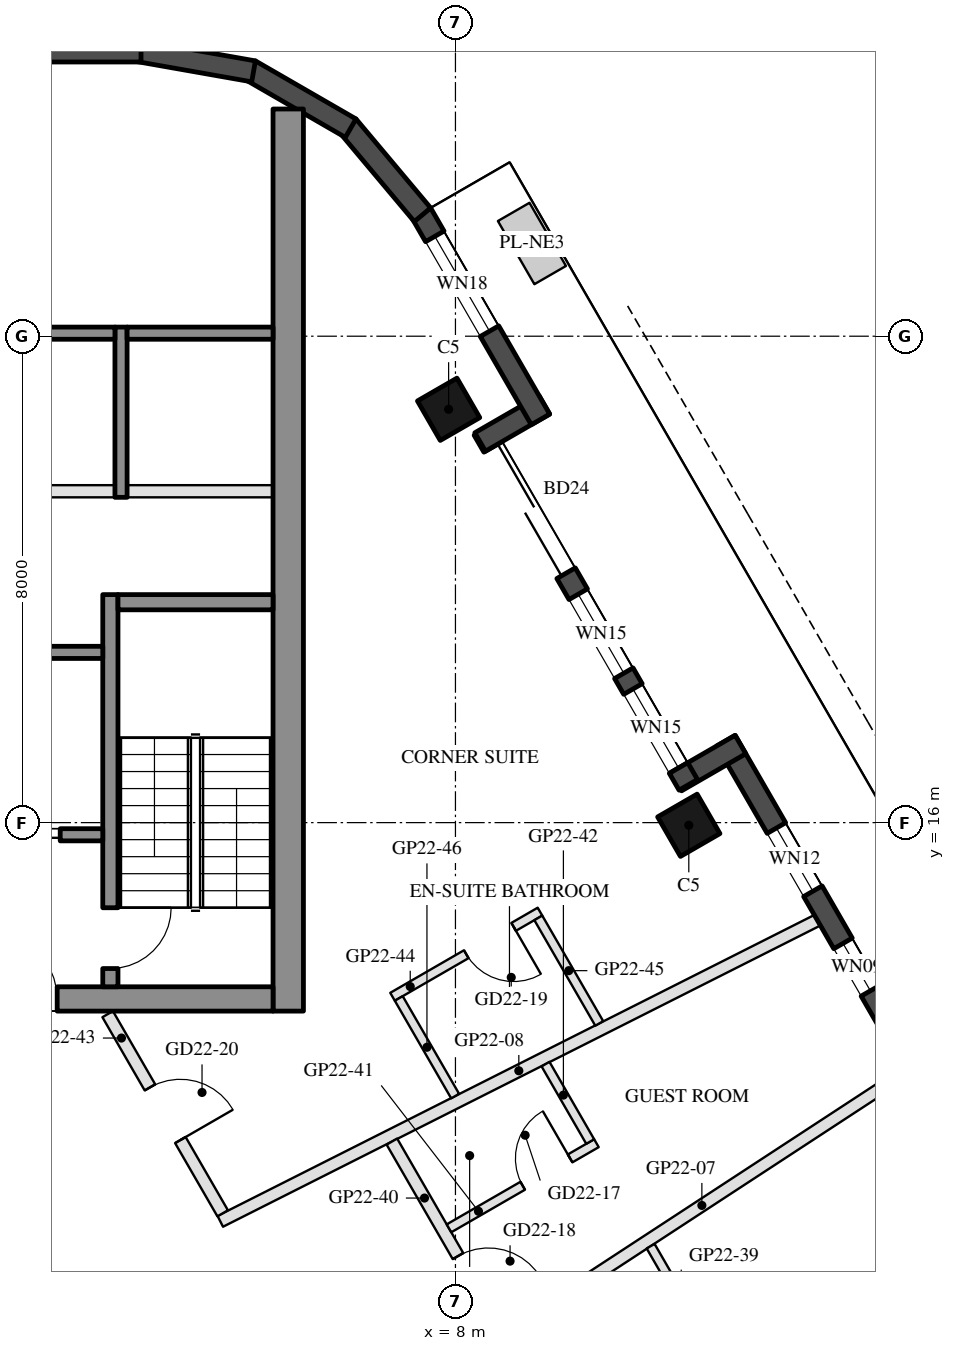
"""IFC4 building model, lengths in metres.
Left out: names, types, materials, properties, quantities, classifications, styles, units other than length and angle.
Written with IfcOpenShell. Run it as: python <this file> out.ifc"""

import sys

from ifc_helpers import new_model, si_unit, direction, frame, frame_2d, origin, origin_2d, place, context, subcontext, project, spatial, rectangle, hollow_rectangle, extrude, element, fill, save


model = new_model("IFC4")
c1 = context("Model", 3, precision=1e-05, world=origin(), true_north=direction((0.0, 1.0)))
c2 = subcontext(c1, "Body", "Model", "MODEL_VIEW")
j1 = project(units=[si_unit("LENGTHUNIT", "METRE"), si_unit("PLANEANGLEUNIT", "RADIAN")], contexts=[c1])
p1 = place(None, origin())
s1 = spatial("IfcSite", under=j1, at=p1, CompositionType="ELEMENT")
p2 = place(p1, origin())
s2 = spatial("IfcBuilding", under=s1, at=p2, CompositionType="ELEMENT")
p3 = place(p2, frame((0.0, 0.0, 224.3)))
s3 = spatial("IfcBuildingStorey", under=s2, at=p3, CompositionType="ELEMENT", Elevation=224.3)
for number, where, z_axis, x_axis in (
    (1, (11.838, 15.957, 0.0), (0.0, 0.0, 1.0), (-0.5, 0.866, 0.0)),
    (2, (7.888, 22.798, 0.0), (0.0, 0.0, 1.0), (-0.5, 0.866, 0.0)),
):
    element("IfcColumn", number, at=place(p3, frame(where, z_axis=z_axis, x_axis=x_axis)), inside=s3, PredefinedType="COLUMN", context=c2, shape_type="SweptSolid", body=[
        extrude(hollow_rectangle(XDim=0.75, YDim=0.75, WallThickness=0.035, at=origin_2d()), origin(), (0.0, 0.0, 1.0), 3.7),
    ])
p4 = place(p3, frame((17.299, 8.948, 0.0), z_axis=(0.0, 0.0, 1.0), x_axis=(-0.500010041276, 0.866019606374, 0.0)))
e3 = element("IfcWall", 3, at=p4, inside=s3, PredefinedType="SOLIDWALL", context=c2, shape_type="SweptSolid", body=[
    extrude(rectangle(XDim=9.7, YDim=0.35, at=frame_2d((4.85, 0.0))), origin(), (0.0, 0.0, 1.0), 3.55),
])
p5 = place(p4, frame((1.637, 0.0, 0.0)))
e4 = element("IfcOpeningElement", 4, at=p5, cuts=e3, PredefinedType="OPENING", context=c2, shape_type="SweptSolid", body=[
    extrude(rectangle(XDim=1.4, YDim=2.4, at=frame_2d((0.7, 1.2))), frame((0.0, 0.185, 0.0), z_axis=(0.0, -1.0, 0.0), x_axis=(1.0, 0.0, 0.0)), (0.0, 0.0, 1.0), 0.37),
])
p6 = place(p4, frame((4.949, 0.0, 0.3)))
e5 = element("IfcOpeningElement", 5, at=p6, cuts=e3, PredefinedType="OPENING", context=c2, shape_type="SweptSolid", body=[
    extrude(rectangle(XDim=0.9, YDim=2.65, at=frame_2d((0.45, 1.325))), frame((0.0, 0.185, 0.0), z_axis=(0.0, -1.0, 0.0), x_axis=(1.0, 0.0, 0.0)), (0.0, 0.0, 1.0), 0.37),
])
p7 = place(p4, frame((6.84, 0.0, 0.3)))
e6 = element("IfcOpeningElement", 6, at=p7, cuts=e3, PredefinedType="OPENING", context=c2, shape_type="SweptSolid", body=[
    extrude(rectangle(XDim=1.2, YDim=2.65, at=frame_2d((0.6, 1.325))), frame((0.0, 0.185, 0.0), z_axis=(0.0, -1.0, 0.0), x_axis=(1.0, 0.0, 0.0)), (0.0, 0.0, 1.0), 0.37),
])
p8 = place(p3, frame((12.688, 17.284, 0.0), z_axis=(0.0, 0.0, 1.0), x_axis=(-0.865955602162, -0.500120880472, 0.0)))
e7 = element("IfcWall", 7, at=p8, inside=s3, PredefinedType="SOLIDWALL", context=c2, shape_type="SweptSolid", body=[
    extrude(rectangle(XDim=1.22, YDim=0.35, at=frame_2d((0.61, 0.0))), origin(), (0.0, 0.0, 1.0), 3.55),
])
p9 = place(p3, frame((11.829, 16.621, 0.0), z_axis=(0.0, 0.0, 1.0), x_axis=(-0.500003597184, 0.866023326939, 0.0)))
e8 = element("IfcWall", 8, at=p9, inside=s3, PredefinedType="SOLIDWALL", context=c2, shape_type="SweptSolid", body=[
    extrude(rectangle(XDim=6.74, YDim=0.35, at=frame_2d((3.37, 0.0))), origin(), (0.0, 0.0, 1.0), 3.55),
])
p10 = place(p9, frame((4.02, 0.0, 0.0)))
e9 = element("IfcOpeningElement", 9, at=p10, cuts=e8, PredefinedType="OPENING", context=c2, shape_type="SweptSolid", body=[
    extrude(rectangle(XDim=2.4, YDim=2.4, at=frame_2d((1.2, 1.2))), frame((0.0, 0.185, 0.0), z_axis=(0.0, -1.0, 0.0), x_axis=(1.0, 0.0, 0.0)), (0.0, 0.0, 1.0), 0.37),
])
p11 = place(p9, frame((0.32, 0.0, 0.3)))
e10 = element("IfcOpeningElement", 10, at=p11, cuts=e8, PredefinedType="OPENING", context=c2, shape_type="SweptSolid", body=[
    extrude(rectangle(XDim=1.5, YDim=2.65, at=frame_2d((0.75, 1.325))), frame((0.0, 0.185, 0.0), z_axis=(0.0, -1.0, 0.0), x_axis=(1.0, 0.0, 0.0)), (0.0, 0.0, 1.0), 0.37),
])
p12 = place(p9, frame((2.12, 0.0, 0.3)))
e11 = element("IfcOpeningElement", 11, at=p12, cuts=e8, PredefinedType="OPENING", context=c2, shape_type="SweptSolid", body=[
    extrude(rectangle(XDim=1.5, YDim=2.65, at=frame_2d((0.75, 1.325))), frame((0.0, 0.185, 0.0), z_axis=(0.0, -1.0, 0.0), x_axis=(1.0, 0.0, 0.0)), (0.0, 0.0, 1.0), 0.37),
])
p13 = place(p3, frame((8.406, 22.26, 0.0), z_axis=(0.0, 0.0, 1.0), x_axis=(0.865955602162, 0.500120880472, 0.0)))
e12 = element("IfcWall", 12, at=p13, inside=s3, PredefinedType="SOLIDWALL", context=c2, shape_type="SweptSolid", body=[
    extrude(rectangle(XDim=1.22, YDim=0.35, at=frame_2d((0.61, 0.0))), origin(), (0.0, 0.0, 1.0), 3.55),
])
p14 = place(p3, frame((9.398, 22.631, 0.0), z_axis=(0.0, 0.0, 1.0), x_axis=(-0.499954521343, 0.866051659307, 0.0)))
e13 = element("IfcWall", 13, at=p14, inside=s3, PredefinedType="SOLIDWALL", context=c2, shape_type="SweptSolid", body=[
    extrude(rectangle(XDim=3.916, YDim=0.35, at=frame_2d((1.958, 0.0))), origin(), (0.0, 0.0, 1.0), 3.55),
])
p15 = place(p14, frame((1.676, 0.0, 0.3)))
e14 = element("IfcOpeningElement", 14, at=p15, cuts=e13, PredefinedType="OPENING", context=c2, shape_type="SweptSolid", body=[
    extrude(rectangle(XDim=1.8, YDim=2.65, at=frame_2d((0.9, 1.325))), frame((0.0, 0.185, 0.0), z_axis=(0.0, -1.0, 0.0), x_axis=(1.0, 0.0, 0.0)), (0.0, 0.0, 1.0), 0.37),
])
p16 = place(p3, frame((7.458, 25.998, 0.0), z_axis=(0.0, 0.0, 1.0), x_axis=(-0.642808304945, 0.766027077259, 0.0)))
e15 = element("IfcWall", 15, at=p16, inside=s3, PredefinedType="SOLIDWALL", context=c2, shape_type="SweptSolid", body=[
    extrude(rectangle(XDim=1.91, YDim=0.35, at=frame_2d((0.955, 0.0))), origin(), (0.0, 0.0, 1.0), 3.55),
])
for number, where, z_axis, x_axis in (
    (16, (6.277, 27.422, 0.0), (0.0, 0.0, 1.0), (-0.866, 0.5, 0.0)),
    (17, (4.68, 28.356, 0.0), (0.0, 0.0, 1.0), (-0.985, 0.174, 0.0)),
):
    element("IfcWall", number, at=place(p3, frame(where, z_axis=z_axis, x_axis=x_axis)), inside=s3, PredefinedType="SOLIDWALL", context=c2, shape_type="SweptSolid", body=[
        extrude(rectangle(XDim=1.91, YDim=0.35, at=frame_2d((0.955, 0.0))), origin(), (0.0, 0.0, 1.0), 3.55),
    ])
p17 = place(p3, frame((2.829, 28.685, 0.0), z_axis=(0.0, 0.0, 1.0), x_axis=(-1.0, 0.0, 0.0)))
e18 = element("IfcWall", 18, at=p17, inside=s3, PredefinedType="SOLIDWALL", context=c2, shape_type="SweptSolid", body=[
    extrude(rectangle(XDim=5.658, YDim=0.35, at=frame_2d((2.829, 0.0))), origin(), (0.0, 0.0, 1.0), 3.55),
])
p18 = place(p3, frame((5.25, 12.9, 0.0), z_axis=(0.0, 0.0, 1.0), x_axis=(0.0, 1.0, 0.0)))
e19 = element("IfcWall", 19, at=p18, inside=s3, PredefinedType="SHEAR", context=c2, shape_type="SweptSolid", body=[
    extrude(rectangle(XDim=14.837, YDim=0.5, at=frame_2d((7.418, 0.0))), origin(), (0.0, 0.0, 1.0), 3.5),
])
p19 = place(p3, frame((5.0, 13.1, 0.0), z_axis=(0.0, 0.0, 1.0), x_axis=(-1.0, 0.0, 0.0)))
e20 = element("IfcWall", 20, at=p19, inside=s3, PredefinedType="SHEAR", context=c2, shape_type="SweptSolid", body=[
    extrude(rectangle(XDim=10.0, YDim=0.4, at=frame_2d((5.0, 0.0))), origin(), (0.0, 0.0, 1.0), 3.5),
])
p20 = place(p19, frame((3.55, 0.0, 0.0)))
e21 = element("IfcOpeningElement", 21, at=p20, cuts=e20, PredefinedType="OPENING", context=c2, shape_type="SweptSolid", body=[
    extrude(rectangle(XDim=1.1, YDim=2.1, at=frame_2d((0.55, 1.05))), frame((0.0, 0.21, 0.0), z_axis=(0.0, -1.0, 0.0), x_axis=(1.0, 0.0, 0.0)), (0.0, 0.0, 1.0), 0.42),
])
p21 = place(p19, frame((5.85, 0.0, 0.0)))
e22 = element("IfcOpeningElement", 22, at=p21, cuts=e20, PredefinedType="OPENING", context=c2, shape_type="SweptSolid", body=[
    extrude(rectangle(XDim=1.4, YDim=2.1, at=frame_2d((0.7, 1.05))), frame((0.0, 0.21, 0.0), z_axis=(0.0, -1.0, 0.0), x_axis=(1.0, 0.0, 0.0)), (0.0, 0.0, 1.0), 0.42),
])
p22 = place(p3, frame((2.325, 13.3, 0.0), z_axis=(0.0, 0.0, 1.0), x_axis=(0.0, 1.0, 0.0)))
e23 = element("IfcWall", 23, at=p22, inside=s3, PredefinedType="SHEAR", context=c2, shape_type="SweptSolid", body=[
    extrude(rectangle(XDim=6.45, YDim=0.25, at=frame_2d((3.225, 0.0))), origin(), (0.0, 0.0, 1.0), 3.5),
])
p23 = place(p22, frame((0.3, 0.0, 0.0)))
e24 = element("IfcOpeningElement", 24, at=p23, cuts=e23, PredefinedType="OPENING", context=c2, shape_type="SweptSolid", body=[
    extrude(rectangle(XDim=1.0, YDim=2.1, at=frame_2d((0.5, 1.05))), frame((0.0, 0.135, 0.0), z_axis=(0.0, -1.0, 0.0), x_axis=(1.0, 0.0, 0.0)), (0.0, 0.0, 1.0), 0.27),
])
p24 = place(p3, frame((5.0, 19.625, 0.0), z_axis=(0.0, 0.0, 1.0), x_axis=(-1.0, 0.0, 0.0)))
e25 = element("IfcWall", 25, at=p24, inside=s3, PredefinedType="SHEAR", context=c2, shape_type="SweptSolid", body=[
    extrude(rectangle(XDim=2.55, YDim=0.25, at=frame_2d((1.275, 0.0))), origin(), (0.0, 0.0, 1.0), 3.5),
])
p25 = place(p3, frame((2.2, 18.8, 0.0), z_axis=(0.0, 0.0, 1.0), x_axis=(-1.0, 0.0, 0.0)))
e26 = element("IfcWall", 26, at=p25, inside=s3, PredefinedType="SHEAR", context=c2, shape_type="SweptSolid", body=[
    extrude(rectangle(XDim=2.8, YDim=0.2, at=frame_2d((1.4, 0.0))), origin(), (0.0, 0.0, 1.0), 3.5),
])
p26 = place(p3, frame((2.2, 15.8, 0.0), z_axis=(0.0, 0.0, 1.0), x_axis=(-1.0, 0.0, 0.0)))
e27 = element("IfcWall", 27, at=p26, inside=s3, PredefinedType="SHEAR", context=c2, shape_type="SweptSolid", body=[
    extrude(rectangle(XDim=2.8, YDim=0.2, at=frame_2d((1.4, 0.0))), origin(), (0.0, 0.0, 1.0), 3.5),
])
p27 = place(p26, frame((0.7, 0.0, 0.0)))
e28 = element("IfcOpeningElement", 28, at=p27, cuts=e27, PredefinedType="OPENING", context=c2, shape_type="SweptSolid", body=[
    extrude(rectangle(XDim=1.2, YDim=2.1, at=frame_2d((0.6, 1.05))), frame((0.0, 0.11, 0.0), z_axis=(0.0, -1.0, 0.0), x_axis=(1.0, 0.0, 0.0)), (0.0, 0.0, 1.0), 0.22),
])
p28 = place(p3, frame((2.5, 21.35, 0.0), z_axis=(0.0, 0.0, 1.0), x_axis=(0.0, 1.0, 0.0)))
e29 = element("IfcWall", 29, at=p28, inside=s3, PredefinedType="SHEAR", context=c2, shape_type="SweptSolid", body=[
    extrude(rectangle(XDim=2.8, YDim=0.2, at=frame_2d((1.4, 0.0))), origin(), (0.0, 0.0, 1.0), 3.5),
])
p29 = place(p3, frame((5.0, 24.05, 0.0), z_axis=(0.0, 0.0, 1.0), x_axis=(-1.0, 0.0, 0.0)))
e30 = element("IfcWall", 30, at=p29, inside=s3, PredefinedType="SHEAR", context=c2, shape_type="SweptSolid", body=[
    extrude(rectangle(XDim=2.4, YDim=0.2, at=frame_2d((1.2, 0.0))), origin(), (0.0, 0.0, 1.0), 3.5),
])
p30 = place(p3, frame((2.4, 24.05, 0.0), z_axis=(0.0, 0.0, 1.0), x_axis=(-1.0, 0.0, 0.0)))
e31 = element("IfcWall", 31, at=p30, inside=s3, PredefinedType="SHEAR", context=c2, shape_type="SweptSolid", body=[
    extrude(rectangle(XDim=2.8, YDim=0.2, at=frame_2d((1.4, 0.0))), origin(), (0.0, 0.0, 1.0), 3.5),
])
p31 = place(p3, frame((5.0, 21.45, 0.0), z_axis=(0.0, 0.0, 1.0), x_axis=(-1.0, 0.0, 0.0)))
e32 = element("IfcWall", 32, at=p31, inside=s3, PredefinedType="PARTITIONING", context=c2, shape_type="SweptSolid", body=[
    extrude(rectangle(XDim=2.4, YDim=0.2, at=frame_2d((1.2, 0.0))), origin(), (0.0, 0.0, 1.0), 3.5),
])
p32 = place(p3, frame((2.4, 21.45, 0.0), z_axis=(0.0, 0.0, 1.0), x_axis=(-1.0, 0.0, 0.0)))
e33 = element("IfcWall", 33, at=p32, inside=s3, PredefinedType="PARTITIONING", context=c2, shape_type="SweptSolid", body=[
    extrude(rectangle(XDim=2.8, YDim=0.2, at=frame_2d((1.4, 0.0))), origin(), (0.0, 0.0, 1.0), 3.5),
])
p33 = place(p3, frame((15.397, 11.892, 0.0), z_axis=(0.0, 0.0, 1.0), x_axis=(-0.836905569615, -0.547347300667, 0.0)))
e34 = element("IfcWall", 34, at=p33, inside=s3, PredefinedType="PARTITIONING", context=c2, shape_type="SweptSolid", body=[
    extrude(rectangle(XDim=7.992, YDim=0.2, at=frame_2d((3.996, 0.0))), origin(), (0.0, 0.0, 1.0), 3.06),
])
p34 = place(p3, frame((13.952, 14.395, 0.0), z_axis=(0.0, 0.0, 1.0), x_axis=(-0.892890171934, -0.450274517226, 0.0)))
e35 = element("IfcWall", 35, at=p34, inside=s3, PredefinedType="PARTITIONING", context=c2, shape_type="SweptSolid", body=[
    extrude(rectangle(XDim=10.998, YDim=0.2, at=frame_2d((5.499, 0.0))), origin(), (0.0, 0.0, 1.0), 3.06),
])
p35 = place(p3, frame((12.211, 7.3, 0.0), z_axis=(0.0, 0.0, 1.0), x_axis=(-0.499982900776, 0.866035275801, 0.0)))
e36 = element("IfcWall", 36, at=p35, inside=s3, PredefinedType="PARTITIONING", context=c2, shape_type="SweptSolid", body=[
    extrude(rectangle(XDim=2.001, YDim=0.15, at=frame_2d((1.001, 0.0))), origin(), (0.0, 0.0, 1.0), 3.55),
])
p36 = place(p3, frame((6.955, 10.754, 0.0), z_axis=(0.0, 0.0, 1.0), x_axis=(0.500018099276, -0.86601495391, 0.0)))
e37 = element("IfcWall", 37, at=p36, inside=s3, PredefinedType="PARTITIONING", context=c2, shape_type="SweptSolid", body=[
    extrude(rectangle(XDim=3.574, YDim=0.2, at=frame_2d((1.787, 0.0))), origin(), (0.0, 0.0, 1.0), 2.95),
])
p37 = place(p36, frame((2.174, 0.0, 0.0)))
e38 = element("IfcOpeningElement", 38, at=p37, cuts=e37, PredefinedType="OPENING", context=c2, shape_type="SweptSolid", body=[
    extrude(rectangle(XDim=1.0, YDim=2.1, at=frame_2d((0.5, 1.05))), frame((0.0, 0.11, 0.0), z_axis=(0.0, -1.0, 0.0), x_axis=(1.0, 0.0, 0.0)), (0.0, 0.0, 1.0), 0.22),
])
p38 = place(p3, frame((7.894, 9.327, 0.0), z_axis=(0.0, 0.0, 1.0), x_axis=(0.865996816683, 0.500049511043, 0.0)))
e39 = element("IfcWall", 39, at=p38, inside=s3, PredefinedType="PARTITIONING", context=c2, shape_type="SweptSolid", body=[
    extrude(rectangle(XDim=2.8, YDim=0.15, at=frame_2d((1.4, 0.0))), origin(), (0.0, 0.0, 1.0), 2.95),
])
p39 = place(p38, frame((1.4, 0.0, 0.0)))
e40 = element("IfcOpeningElement", 40, at=p39, cuts=e39, PredefinedType="OPENING", context=c2, shape_type="SweptSolid", body=[
    extrude(rectangle(XDim=0.9, YDim=2.1, at=frame_2d((0.45, 1.05))), frame((0.0, 0.085, 0.0), z_axis=(0.0, -1.0, 0.0), x_axis=(1.0, 0.0, 0.0)), (0.0, 0.0, 1.0), 0.17),
])
p40 = place(p3, frame((10.216, 10.755, 0.0), z_axis=(0.0, 0.0, 1.0), x_axis=(-0.50001473959, 0.866016893711, 0.0)))
e41 = element("IfcWall", 41, at=p40, inside=s3, PredefinedType="PARTITIONING", context=c2, shape_type="SweptSolid", body=[
    extrude(rectangle(XDim=1.47, YDim=0.15, at=frame_2d((0.735, 0.0))), origin(), (0.0, 0.0, 1.0), 3.55),
])
p41 = place(p3, frame((2.281, 12.85, 0.0), z_axis=(0.0, 0.0, 1.0), x_axis=(0.499985062256, -0.866034027923, 0.0)))
e42 = element("IfcWall", 42, at=p41, inside=s3, PredefinedType="PARTITIONING", context=c2, shape_type="SweptSolid", body=[
    extrude(rectangle(XDim=3.782, YDim=0.2, at=frame_2d((1.891, 0.0))), origin(), (0.0, 0.0, 1.0), 2.95),
])
p42 = place(p41, frame((1.391, 0.0, 0.0)))
e43 = element("IfcOpeningElement", 43, at=p42, cuts=e42, PredefinedType="OPENING", context=c2, shape_type="SweptSolid", body=[
    extrude(rectangle(XDim=1.0, YDim=2.1, at=frame_2d((0.5, 1.05))), frame((0.0, 0.11, 0.0), z_axis=(0.0, -1.0, 0.0), x_axis=(1.0, 0.0, 0.0)), (0.0, 0.0, 1.0), 0.22),
])
p43 = place(p3, frame((9.39, 14.536, 0.0), z_axis=(0.0, 0.0, 1.0), x_axis=(-0.866034573852, -0.49998411664, 0.0)))
e44 = element("IfcWall", 44, at=p43, inside=s3, PredefinedType="PARTITIONING", context=c2, shape_type="SweptSolid", body=[
    extrude(rectangle(XDim=2.8, YDim=0.15, at=frame_2d((1.4, 0.0))), origin(), (0.0, 0.0, 1.0), 2.95),
])
p44 = place(p43, frame((0.5, 0.0, 0.0)))
e45 = element("IfcOpeningElement", 45, at=p44, cuts=e44, PredefinedType="OPENING", context=c2, shape_type="SweptSolid", body=[
    extrude(rectangle(XDim=0.9, YDim=2.1, at=frame_2d((0.45, 1.05))), frame((0.0, 0.085, 0.0), z_axis=(0.0, -1.0, 0.0), x_axis=(1.0, 0.0, 0.0)), (0.0, 0.0, 1.0), 0.17),
])
p45 = place(p3, frame((10.365, 12.698, 0.0), z_axis=(0.0, 0.0, 1.0), x_axis=(-0.500056363668, 0.86599285976, 0.0)))
e46 = element("IfcWall", 46, at=p45, inside=s3, PredefinedType="PARTITIONING", context=c2, shape_type="SweptSolid", body=[
    extrude(rectangle(XDim=2.004, YDim=0.15, at=frame_2d((1.002, 0.0))), origin(), (0.0, 0.0, 1.0), 2.95),
])
p46 = place(p3, frame((7.995, 11.502, 0.0), z_axis=(0.0, 0.0, 1.0), x_axis=(-0.4999770169, 0.866038672677, 0.0)))
e47 = element("IfcWall", 47, at=p46, inside=s3, PredefinedType="PARTITIONING", context=c2, shape_type="SweptSolid", body=[
    extrude(rectangle(XDim=1.854, YDim=0.15, at=frame_2d((0.927, 0.0))), origin(), (0.0, 0.0, 1.0), 2.95),
])
p47 = place(p6, origin())
e48 = element("IfcWindow", 48, at=p47, inside=s3, PartitioningType="SINGLE_PANEL", PredefinedType="WINDOW", context=c2, shape_type="SweptSolid", body=[
    extrude(rectangle(XDim=0.9, YDim=2.65, at=frame_2d((0.45, 1.325))), frame((0.0, 0.03, 0.0), z_axis=(0.0, -1.0, 0.0), x_axis=(1.0, 0.0, 0.0)), (0.0, 0.0, 1.0), 0.06),
])
fill(e5, e48)
p48 = place(p7, origin())
e49 = element("IfcWindow", 49, at=p48, inside=s3, PartitioningType="SINGLE_PANEL", PredefinedType="WINDOW", context=c2, shape_type="SweptSolid", body=[
    extrude(rectangle(XDim=1.2, YDim=2.65, at=frame_2d((0.6, 1.325))), frame((0.0, 0.03, 0.0), z_axis=(0.0, -1.0, 0.0), x_axis=(1.0, 0.0, 0.0)), (0.0, 0.0, 1.0), 0.06),
])
fill(e6, e49)
p49 = place(p10, frame((2.4, 0.0, 0.0), z_axis=(0.0, 0.0, 1.0), x_axis=(-1.0, 0.0, 0.0)))
e50 = element("IfcDoor", 50, at=p49, inside=s3, OperationType="SLIDING_TO_LEFT", PredefinedType="DOOR", context=c2, shape_type="SweptSolid", body=[
    extrude(rectangle(XDim=2.4, YDim=2.4, at=frame_2d((1.2, 1.2))), frame((0.0, 0.025, 0.0), z_axis=(0.0, -1.0, 0.0), x_axis=(1.0, 0.0, 0.0)), (0.0, 0.0, 1.0), 0.05),
])
fill(e9, e50)
p50 = place(p11, origin())
e51 = element("IfcWindow", 51, at=p50, inside=s3, PartitioningType="SINGLE_PANEL", PredefinedType="WINDOW", context=c2, shape_type="SweptSolid", body=[
    extrude(rectangle(XDim=1.5, YDim=2.65, at=frame_2d((0.75, 1.325))), frame((0.0, 0.03, 0.0), z_axis=(0.0, -1.0, 0.0), x_axis=(1.0, 0.0, 0.0)), (0.0, 0.0, 1.0), 0.06),
])
fill(e10, e51)
p51 = place(p12, origin())
e52 = element("IfcWindow", 52, at=p51, inside=s3, PartitioningType="SINGLE_PANEL", PredefinedType="WINDOW", context=c2, shape_type="SweptSolid", body=[
    extrude(rectangle(XDim=1.5, YDim=2.65, at=frame_2d((0.75, 1.325))), frame((0.0, 0.03, 0.0), z_axis=(0.0, -1.0, 0.0), x_axis=(1.0, 0.0, 0.0)), (0.0, 0.0, 1.0), 0.06),
])
fill(e11, e52)
p52 = place(p15, origin())
e53 = element("IfcWindow", 53, at=p52, inside=s3, PartitioningType="SINGLE_PANEL", PredefinedType="WINDOW", context=c2, shape_type="SweptSolid", body=[
    extrude(rectangle(XDim=1.8, YDim=2.65, at=frame_2d((0.9, 1.325))), frame((0.0, 0.03, 0.0), z_axis=(0.0, -1.0, 0.0), x_axis=(1.0, 0.0, 0.0)), (0.0, 0.0, 1.0), 0.06),
])
fill(e14, e53)
p53 = place(p27, origin())
e54 = element("IfcDoor", 54, at=p53, inside=s3, OperationType="DOUBLE_DOOR_SLIDING", PredefinedType="DOOR", context=c2, shape_type="SweptSolid", body=[
    extrude(rectangle(XDim=1.2, YDim=2.1, at=frame_2d((0.6, 1.05))), frame((0.0, 0.025, 0.0), z_axis=(0.0, -1.0, 0.0), x_axis=(1.0, 0.0, 0.0)), (0.0, 0.0, 1.0), 0.05),
])
fill(e28, e54)
p54 = place(p20, frame((1.1, 0.0, 0.0), z_axis=(0.0, 0.0, 1.0), x_axis=(-1.0, 0.0, 0.0)))
e55 = element("IfcDoor", 55, at=p54, inside=s3, OperationType="SINGLE_SWING_LEFT", PredefinedType="DOOR", context=c2, shape_type="SweptSolid", body=[
    extrude(rectangle(XDim=1.1, YDim=2.1, at=frame_2d((0.55, 1.05))), frame((0.0, 0.025, 0.0), z_axis=(0.0, -1.0, 0.0), x_axis=(1.0, 0.0, 0.0)), (0.0, 0.0, 1.0), 0.05),
])
fill(e21, e55)
p55 = place(p23, frame((1.0, 0.0, 0.0), z_axis=(0.0, 0.0, 1.0), x_axis=(-1.0, 0.0, 0.0)))
e56 = element("IfcDoor", 56, at=p55, inside=s3, OperationType="SINGLE_SWING_LEFT", PredefinedType="DOOR", context=c2, shape_type="SweptSolid", body=[
    extrude(rectangle(XDim=1.0, YDim=2.1, at=frame_2d((0.5, 1.05))), frame((0.0, 0.025, 0.0), z_axis=(0.0, -1.0, 0.0), x_axis=(1.0, 0.0, 0.0)), (0.0, 0.0, 1.0), 0.05),
])
fill(e24, e56)
p56 = place(p39, origin())
e57 = element("IfcDoor", 57, at=p56, inside=s3, OperationType="SINGLE_SWING_RIGHT", PredefinedType="DOOR", context=c2, shape_type="SweptSolid", body=[
    extrude(rectangle(XDim=0.9, YDim=2.1, at=frame_2d((0.45, 1.05))), frame((0.0, 0.025, 0.0), z_axis=(0.0, -1.0, 0.0), x_axis=(1.0, 0.0, 0.0)), (0.0, 0.0, 1.0), 0.05),
])
fill(e40, e57)
p57 = place(p37, origin())
e58 = element("IfcDoor", 58, at=p57, inside=s3, OperationType="SINGLE_SWING_RIGHT", PredefinedType="DOOR", context=c2, shape_type="SweptSolid", body=[
    extrude(rectangle(XDim=1.0, YDim=2.1, at=frame_2d((0.5, 1.05))), frame((0.0, 0.025, 0.0), z_axis=(0.0, -1.0, 0.0), x_axis=(1.0, 0.0, 0.0)), (0.0, 0.0, 1.0), 0.05),
])
fill(e38, e58)
p58 = place(p44, origin())
e59 = element("IfcDoor", 59, at=p58, inside=s3, OperationType="SINGLE_SWING_LEFT", PredefinedType="DOOR", context=c2, shape_type="SweptSolid", body=[
    extrude(rectangle(XDim=0.9, YDim=2.1, at=frame_2d((0.45, 1.05))), frame((0.0, 0.025, 0.0), z_axis=(0.0, -1.0, 0.0), x_axis=(1.0, 0.0, 0.0)), (0.0, 0.0, 1.0), 0.05),
])
fill(e45, e59)
p59 = place(p42, origin())
e60 = element("IfcDoor", 60, at=p59, inside=s3, OperationType="SINGLE_SWING_RIGHT", PredefinedType="DOOR", context=c2, shape_type="SweptSolid", body=[
    extrude(rectangle(XDim=1.0, YDim=2.1, at=frame_2d((0.5, 1.05))), frame((0.0, 0.025, 0.0), z_axis=(0.0, -1.0, 0.0), x_axis=(1.0, 0.0, 0.0)), (0.0, 0.0, 1.0), 0.05),
])
fill(e43, e60)
save(model, sys.argv[1])
